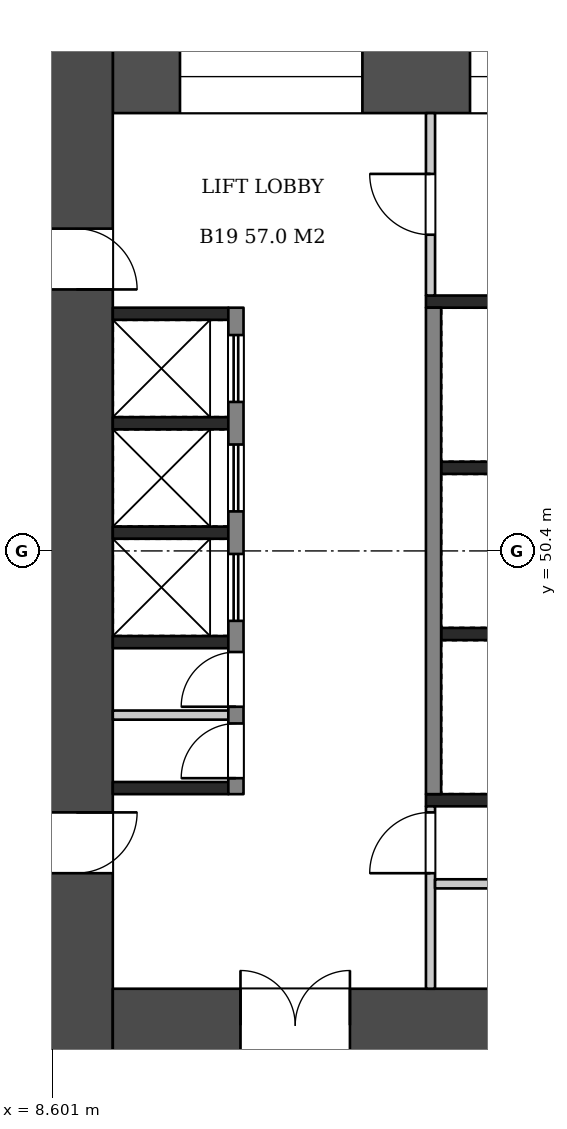
"""IFC4 building model, lengths in metres.
Left out: names, types, materials, properties, quantities, classifications, styles, units other than length and angle.
Written with IfcOpenShell. Run it as: python <this file> out.ifc"""

import sys

from ifc_helpers import new_model, si_unit, direction, frame, frame_2d, origin, place, context, subcontext, project, spatial, rectangle, extrude, element, fill, save


model = new_model("IFC4")
c1 = context("Model", 3, precision=1e-05, world=origin(), true_north=direction((0.0, 1.0)))
c2 = subcontext(c1, "Body", "Model", "MODEL_VIEW")
j1 = project(units=[si_unit("LENGTHUNIT", "METRE"), si_unit("PLANEANGLEUNIT", "RADIAN")], contexts=[c1])
p1 = place(None, origin())
s1 = spatial("IfcSite", under=j1, at=p1, CompositionType="ELEMENT")
p2 = place(p1, origin())
s2 = spatial("IfcBuilding", under=s1, at=p2, CompositionType="ELEMENT")
p3 = place(p2, frame((0.0, 0.0, 81.2)))
s3 = spatial("IfcBuildingStorey", under=s2, at=p3, CompositionType="ELEMENT", Elevation=81.2)
p4 = place(p3, frame((9.0, 58.8, 0.0), z_axis=(0.0, 0.0, 1.0), x_axis=(0.0, -1.0, 0.0)))
e1 = element("IfcWall", 1, at=p4, inside=s3, PredefinedType="SHEAR", context=c2, shape_type="SweptSolid", body=[
    extrude(rectangle(XDim=16.8, YDim=1.2, at=frame_2d((8.4, 0.0))), origin(), (0.0, 0.0, 1.0), 3.22),
])
p5 = place(p4, frame((3.1, 0.0, 0.0)))
e2 = element("IfcOpeningElement", 2, at=p5, cuts=e1, PredefinedType="OPENING", context=c2, shape_type="SweptSolid", body=[
    extrude(rectangle(XDim=1.0, YDim=2.1, at=frame_2d((0.5, 1.05))), frame((0.0, 0.61, 0.0), z_axis=(0.0, -1.0, 0.0), x_axis=(1.0, 0.0, 0.0)), (0.0, 0.0, 1.0), 1.22),
])
p6 = place(p4, frame((12.7, 0.0, 0.0)))
e3 = element("IfcOpeningElement", 3, at=p6, cuts=e1, PredefinedType="OPENING", context=c2, shape_type="SweptSolid", body=[
    extrude(rectangle(XDim=1.0, YDim=2.1, at=frame_2d((0.5, 1.05))), frame((0.0, 0.61, 0.0), z_axis=(0.0, -1.0, 0.0), x_axis=(1.0, 0.0, 0.0)), (0.0, 0.0, 1.0), 1.22),
])
p7 = place(p3, frame((9.6, 58.2, 0.0), z_axis=(0.0, 0.0, 1.0), x_axis=(1.0, 0.0, 0.0)))
e4 = element("IfcWall", 4, at=p7, inside=s3, PredefinedType="SHEAR", context=c2, shape_type="SweptSolid", body=[
    extrude(rectangle(XDim=14.4, YDim=1.2, at=frame_2d((7.2, 0.0))), origin(), (0.0, 0.0, 1.0), 3.22),
])
p8 = place(p7, frame((1.105, 0.0, 0.6)))
e5 = element("IfcOpeningElement", 5, at=p8, cuts=e4, PredefinedType="OPENING", context=c2, shape_type="SweptSolid", body=[
    extrude(rectangle(XDim=3.0, YDim=2.1, at=frame_2d((1.5, 1.05))), frame((0.0, 0.61, 0.0), z_axis=(0.0, -1.0, 0.0), x_axis=(1.0, 0.0, 0.0)), (0.0, 0.0, 1.0), 1.22),
])
p9 = place(p7, frame((5.875, 0.0, 0.6)))
e6 = element("IfcOpeningElement", 6, at=p9, cuts=e4, PredefinedType="OPENING", context=c2, shape_type="SweptSolid", body=[
    extrude(rectangle(XDim=2.4, YDim=2.1, at=frame_2d((1.2, 1.05))), frame((0.0, 0.61, 0.0), z_axis=(0.0, -1.0, 0.0), x_axis=(1.0, 0.0, 0.0)), (0.0, 0.0, 1.0), 1.22),
])
p10 = place(p7, frame((9.993, 0.0, 0.5)))
e7 = element("IfcOpeningElement", 7, at=p10, cuts=e4, PredefinedType="OPENING", context=c2, shape_type="SweptSolid", body=[
    extrude(rectangle(XDim=1.2, YDim=2.4, at=frame_2d((0.6, 1.2))), frame((0.0, 0.61, 0.0), z_axis=(0.0, -1.0, 0.0), x_axis=(1.0, 0.0, 0.0)), (0.0, 0.0, 1.0), 1.22),
])
p11 = place(p7, frame((12.197, 0.0, 0.5)))
e8 = element("IfcOpeningElement", 8, at=p11, cuts=e4, PredefinedType="OPENING", context=c2, shape_type="SweptSolid", body=[
    extrude(rectangle(XDim=1.2, YDim=2.4, at=frame_2d((0.6, 1.2))), frame((0.0, 0.61, 0.0), z_axis=(0.0, -1.0, 0.0), x_axis=(1.0, 0.0, 0.0)), (0.0, 0.0, 1.0), 1.22),
])
p12 = place(p3, frame((9.6, 42.6, 0.0), z_axis=(0.0, 0.0, 1.0), x_axis=(1.0, 0.0, 0.0)))
e9 = element("IfcWall", 9, at=p12, inside=s3, PredefinedType="SHEAR", context=c2, shape_type="SweptSolid", body=[
    extrude(rectangle(XDim=14.4, YDim=1.2, at=frame_2d((7.2, 0.0))), origin(), (0.0, 0.0, 1.0), 3.22),
])
p13 = place(p12, frame((2.1, 0.0, 0.0)))
e10 = element("IfcOpeningElement", 10, at=p13, cuts=e9, PredefinedType="OPENING", context=c2, shape_type="SweptSolid", body=[
    extrude(rectangle(XDim=1.8, YDim=2.1, at=frame_2d((0.9, 1.05))), frame((0.0, 0.61, 0.0), z_axis=(0.0, -1.0, 0.0), x_axis=(1.0, 0.0, 0.0)), (0.0, 0.0, 1.0), 1.22),
])
for number, where, z_axis, x_axis in (
    (11, (9.6, 54.3, 0.0), (0.0, 0.0, 1.0), (1.0, 0.0, 0.0)),
    (12, (9.6, 52.5, 0.0), (0.0, 0.0, 1.0), (1.0, 0.0, 0.0)),
    (13, (9.6, 50.7, 0.0), (0.0, 0.0, 1.0), (1.0, 0.0, 0.0)),
    (14, (9.6, 48.9, 0.0), (0.0, 0.0, 1.0), (1.0, 0.0, 0.0)),
    (15, (9.6, 46.5, 0.0), (0.0, 0.0, 1.0), (1.0, 0.0, 0.0)),
):
    element("IfcWall", number, at=place(p3, frame(where, z_axis=z_axis, x_axis=x_axis)), inside=s3, PredefinedType="SHEAR", context=c2, shape_type="SweptSolid", body=[
        extrude(rectangle(XDim=1.9, YDim=0.2, at=frame_2d((0.95, 0.0))), origin(), (0.0, 0.0, 1.0), 3.22),
    ])
p14 = place(p3, frame((9.6, 47.7, 0.0), z_axis=(0.0, 0.0, 1.0), x_axis=(1.0, 0.0, 0.0)))
e16 = element("IfcWall", 16, at=p14, inside=s3, PredefinedType="PARTITIONING", context=c2, shape_type="SweptSolid", body=[
    extrude(rectangle(XDim=1.9, YDim=0.15, at=frame_2d((0.95, 0.0))), origin(), (0.0, 0.0, 1.0), 3.22),
])
p15 = place(p3, frame((11.625, 54.4, 0.0), z_axis=(0.0, 0.0, 1.0), x_axis=(0.0, -1.0, 0.0)))
e17 = element("IfcWall", 17, at=p15, inside=s3, PredefinedType="SHEAR", context=c2, shape_type="SweptSolid", body=[
    extrude(rectangle(XDim=8.0, YDim=0.25, at=frame_2d((4.0, 0.0))), origin(), (0.0, 0.0, 1.0), 3.22),
])
p16 = place(p15, frame((0.45, 0.0, 0.0)))
e18 = element("IfcOpeningElement", 18, at=p16, cuts=e17, PredefinedType="OPENING", context=c2, shape_type="SweptSolid", body=[
    extrude(rectangle(XDim=1.1, YDim=2.1, at=frame_2d((0.55, 1.05))), frame((0.0, 0.135, 0.0), z_axis=(0.0, -1.0, 0.0), x_axis=(1.0, 0.0, 0.0)), (0.0, 0.0, 1.0), 0.27),
])
p17 = place(p15, frame((2.25, 0.0, 0.0)))
e19 = element("IfcOpeningElement", 19, at=p17, cuts=e17, PredefinedType="OPENING", context=c2, shape_type="SweptSolid", body=[
    extrude(rectangle(XDim=1.1, YDim=2.1, at=frame_2d((0.55, 1.05))), frame((0.0, 0.135, 0.0), z_axis=(0.0, -1.0, 0.0), x_axis=(1.0, 0.0, 0.0)), (0.0, 0.0, 1.0), 0.27),
])
p18 = place(p15, frame((4.05, 0.0, 0.0)))
e20 = element("IfcOpeningElement", 20, at=p18, cuts=e17, PredefinedType="OPENING", context=c2, shape_type="SweptSolid", body=[
    extrude(rectangle(XDim=1.1, YDim=2.1, at=frame_2d((0.55, 1.05))), frame((0.0, 0.135, 0.0), z_axis=(0.0, -1.0, 0.0), x_axis=(1.0, 0.0, 0.0)), (0.0, 0.0, 1.0), 0.27),
])
p19 = place(p15, frame((5.663, 0.0, 0.0)))
e21 = element("IfcOpeningElement", 21, at=p19, cuts=e17, PredefinedType="OPENING", context=c2, shape_type="SweptSolid", body=[
    extrude(rectangle(XDim=0.9, YDim=2.1, at=frame_2d((0.45, 1.05))), frame((0.0, 0.135, 0.0), z_axis=(0.0, -1.0, 0.0), x_axis=(1.0, 0.0, 0.0)), (0.0, 0.0, 1.0), 0.27),
])
p20 = place(p15, frame((6.837, 0.0, 0.0)))
e22 = element("IfcOpeningElement", 22, at=p20, cuts=e17, PredefinedType="OPENING", context=c2, shape_type="SweptSolid", body=[
    extrude(rectangle(XDim=0.9, YDim=2.1, at=frame_2d((0.45, 1.05))), frame((0.0, 0.135, 0.0), z_axis=(0.0, -1.0, 0.0), x_axis=(1.0, 0.0, 0.0)), (0.0, 0.0, 1.0), 0.27),
])
for number, where, z_axis, x_axis in (
    (23, (15.0, 51.767, 0.0), (0.0, 0.0, 1.0), (1.0, 0.0, 0.0)),
    (24, (15.0, 49.033, 0.0), (0.0, 0.0, 1.0), (1.0, 0.0, 0.0)),
):
    element("IfcWall", number, at=place(p3, frame(where, z_axis=z_axis, x_axis=x_axis)), inside=s3, PredefinedType="SHEAR", context=c2, shape_type="SweptSolid", body=[
        extrude(rectangle(XDim=1.9, YDim=0.2, at=frame_2d((0.95, 0.0))), origin(), (0.0, 0.0, 1.0), 3.22),
    ])
p21 = place(p3, frame((14.875, 54.4, 0.0), z_axis=(0.0, 0.0, 1.0), x_axis=(0.0, -1.0, 0.0)))
e25 = element("IfcWall", 25, at=p21, inside=s3, PredefinedType="SHEAR", context=c2, shape_type="SweptSolid", body=[
    extrude(rectangle(XDim=8.0, YDim=0.25, at=frame_2d((4.0, 0.0))), origin(), (0.0, 0.0, 1.0), 3.22),
])
p22 = place(p3, frame((14.75, 54.5, 0.0), z_axis=(0.0, 0.0, 1.0), x_axis=(1.0, 0.0, 0.0)))
e26 = element("IfcWall", 26, at=p22, inside=s3, PredefinedType="SHEAR", context=c2, shape_type="SweptSolid", body=[
    extrude(rectangle(XDim=2.4, YDim=0.2, at=frame_2d((1.2, 0.0))), origin(), (0.0, 0.0, 1.0), 3.22),
])
p23 = place(p3, frame((14.825, 57.6, 0.0), z_axis=(0.0, 0.0, 1.0), x_axis=(0.0, -1.0, 0.0)))
e27 = element("IfcWall", 27, at=p23, inside=s3, PredefinedType="PARTITIONING", context=c2, shape_type="SweptSolid", body=[
    extrude(rectangle(XDim=3.0, YDim=0.15, at=frame_2d((1.5, 0.0))), origin(), (0.0, 0.0, 1.0), 3.22),
])
p24 = place(p23, frame((1.0, 0.0, 0.0)))
e28 = element("IfcOpeningElement", 28, at=p24, cuts=e27, PredefinedType="OPENING", context=c2, shape_type="SweptSolid", body=[
    extrude(rectangle(XDim=1.0, YDim=2.1, at=frame_2d((0.5, 1.05))), frame((0.0, 0.085, 0.0), z_axis=(0.0, -1.0, 0.0), x_axis=(1.0, 0.0, 0.0)), (0.0, 0.0, 1.0), 0.17),
])
p25 = place(p3, frame((14.75, 46.3, 0.0), z_axis=(0.0, 0.0, 1.0), x_axis=(1.0, 0.0, 0.0)))
e29 = element("IfcWall", 29, at=p25, inside=s3, PredefinedType="SHEAR", context=c2, shape_type="SweptSolid", body=[
    extrude(rectangle(XDim=9.25, YDim=0.2, at=frame_2d((4.625, 0.0))), origin(), (0.0, 0.0, 1.0), 3.22),
])
p26 = place(p3, frame((14.825, 46.2, 0.0), z_axis=(0.0, 0.0, 1.0), x_axis=(0.0, -1.0, 0.0)))
e30 = element("IfcWall", 30, at=p26, inside=s3, PredefinedType="PARTITIONING", context=c2, shape_type="SweptSolid", body=[
    extrude(rectangle(XDim=3.0, YDim=0.15, at=frame_2d((1.5, 0.0))), origin(), (0.0, 0.0, 1.0), 3.22),
])
p27 = place(p26, frame((0.1, 0.0, 0.0)))
e31 = element("IfcOpeningElement", 31, at=p27, cuts=e30, PredefinedType="OPENING", context=c2, shape_type="SweptSolid", body=[
    extrude(rectangle(XDim=1.0, YDim=2.1, at=frame_2d((0.5, 1.05))), frame((0.0, 0.085, 0.0), z_axis=(0.0, -1.0, 0.0), x_axis=(1.0, 0.0, 0.0)), (0.0, 0.0, 1.0), 0.17),
])
p28 = place(p3, frame((14.9, 44.925, 0.0), z_axis=(0.0, 0.0, 1.0), x_axis=(1.0, 0.0, 0.0)))
e32 = element("IfcWall", 32, at=p28, inside=s3, PredefinedType="PARTITIONING", context=c2, shape_type="SweptSolid", body=[
    extrude(rectangle(XDim=9.1, YDim=0.15, at=frame_2d((4.55, 0.0))), origin(), (0.0, 0.0, 1.0), 3.22),
])
p29 = place(p28, frame((1.31, 0.0, 0.0)))
e33 = element("IfcOpeningElement", 33, at=p29, cuts=e32, PredefinedType="OPENING", context=c2, shape_type="SweptSolid", body=[
    extrude(rectangle(XDim=0.9, YDim=2.1, at=frame_2d((0.45, 1.05))), frame((0.0, 0.085, 0.0), z_axis=(0.0, -1.0, 0.0), x_axis=(1.0, 0.0, 0.0)), (0.0, 0.0, 1.0), 0.17),
])
p30 = place(p28, frame((4.54, 0.0, 0.0)))
e34 = element("IfcOpeningElement", 34, at=p30, cuts=e32, PredefinedType="OPENING", context=c2, shape_type="SweptSolid", body=[
    extrude(rectangle(XDim=0.9, YDim=2.1, at=frame_2d((0.45, 1.05))), frame((0.0, 0.085, 0.0), z_axis=(0.0, -1.0, 0.0), x_axis=(1.0, 0.0, 0.0)), (0.0, 0.0, 1.0), 0.17),
])
p31 = place(p28, frame((7.33, 0.0, 0.0)))
e35 = element("IfcOpeningElement", 35, at=p31, cuts=e32, PredefinedType="OPENING", context=c2, shape_type="SweptSolid", body=[
    extrude(rectangle(XDim=0.9, YDim=2.1, at=frame_2d((0.45, 1.05))), frame((0.0, 0.085, 0.0), z_axis=(0.0, -1.0, 0.0), x_axis=(1.0, 0.0, 0.0)), (0.0, 0.0, 1.0), 0.17),
])
p32 = place(p5, origin())
e36 = element("IfcDoor", 36, at=p32, inside=s3, OperationType="SINGLE_SWING_RIGHT", PredefinedType="DOOR", context=c2, shape_type="SweptSolid", body=[
    extrude(rectangle(XDim=1.0, YDim=2.1, at=frame_2d((0.5, 1.05))), frame((0.0, 0.025, 0.0), z_axis=(0.0, -1.0, 0.0), x_axis=(1.0, 0.0, 0.0)), (0.0, 0.0, 1.0), 0.05),
])
fill(e2, e36)
p33 = place(p6, origin())
e37 = element("IfcDoor", 37, at=p33, inside=s3, OperationType="SINGLE_SWING_LEFT", PredefinedType="DOOR", context=c2, shape_type="SweptSolid", body=[
    extrude(rectangle(XDim=1.0, YDim=2.1, at=frame_2d((0.5, 1.05))), frame((0.0, 0.025, 0.0), z_axis=(0.0, -1.0, 0.0), x_axis=(1.0, 0.0, 0.0)), (0.0, 0.0, 1.0), 0.05),
])
fill(e3, e37)
p34 = place(p13, origin())
e38 = element("IfcDoor", 38, at=p34, inside=s3, OperationType="DOUBLE_DOOR_SINGLE_SWING", PredefinedType="DOOR", context=c2, shape_type="SweptSolid", body=[
    extrude(rectangle(XDim=1.8, YDim=2.1, at=frame_2d((0.9, 1.05))), frame((0.0, 0.025, 0.0), z_axis=(0.0, -1.0, 0.0), x_axis=(1.0, 0.0, 0.0)), (0.0, 0.0, 1.0), 0.05),
])
fill(e10, e38)
p35 = place(p16, origin())
e39 = element("IfcDoor", 39, at=p35, inside=s3, OperationType="DOUBLE_DOOR_SLIDING", PredefinedType="DOOR", context=c2, shape_type="SweptSolid", body=[
    extrude(rectangle(XDim=1.1, YDim=2.1, at=frame_2d((0.55, 1.05))), frame((0.0, 0.025, 0.0), z_axis=(0.0, -1.0, 0.0), x_axis=(1.0, 0.0, 0.0)), (0.0, 0.0, 1.0), 0.05),
])
fill(e18, e39)
p36 = place(p17, origin())
e40 = element("IfcDoor", 40, at=p36, inside=s3, OperationType="DOUBLE_DOOR_SLIDING", PredefinedType="DOOR", context=c2, shape_type="SweptSolid", body=[
    extrude(rectangle(XDim=1.1, YDim=2.1, at=frame_2d((0.55, 1.05))), frame((0.0, 0.025, 0.0), z_axis=(0.0, -1.0, 0.0), x_axis=(1.0, 0.0, 0.0)), (0.0, 0.0, 1.0), 0.05),
])
fill(e19, e40)
p37 = place(p18, origin())
e41 = element("IfcDoor", 41, at=p37, inside=s3, OperationType="DOUBLE_DOOR_SLIDING", PredefinedType="DOOR", context=c2, shape_type="SweptSolid", body=[
    extrude(rectangle(XDim=1.1, YDim=2.1, at=frame_2d((0.55, 1.05))), frame((0.0, 0.025, 0.0), z_axis=(0.0, -1.0, 0.0), x_axis=(1.0, 0.0, 0.0)), (0.0, 0.0, 1.0), 0.05),
])
fill(e20, e41)
p38 = place(p19, frame((0.9, 0.0, 0.0), z_axis=(0.0, 0.0, 1.0), x_axis=(-1.0, 0.0, 0.0)))
e42 = element("IfcDoor", 42, at=p38, inside=s3, OperationType="SINGLE_SWING_LEFT", PredefinedType="DOOR", context=c2, shape_type="SweptSolid", body=[
    extrude(rectangle(XDim=0.9, YDim=2.1, at=frame_2d((0.45, 1.05))), frame((0.0, 0.025, 0.0), z_axis=(0.0, -1.0, 0.0), x_axis=(1.0, 0.0, 0.0)), (0.0, 0.0, 1.0), 0.05),
])
fill(e21, e42)
p39 = place(p20, frame((0.9, 0.0, 0.0), z_axis=(0.0, 0.0, 1.0), x_axis=(-1.0, 0.0, 0.0)))
e43 = element("IfcDoor", 43, at=p39, inside=s3, OperationType="SINGLE_SWING_LEFT", PredefinedType="DOOR", context=c2, shape_type="SweptSolid", body=[
    extrude(rectangle(XDim=0.9, YDim=2.1, at=frame_2d((0.45, 1.05))), frame((0.0, 0.025, 0.0), z_axis=(0.0, -1.0, 0.0), x_axis=(1.0, 0.0, 0.0)), (0.0, 0.0, 1.0), 0.05),
])
fill(e22, e43)
p40 = place(p24, frame((1.0, 0.0, 0.0), z_axis=(0.0, 0.0, 1.0), x_axis=(-1.0, 0.0, 0.0)))
e44 = element("IfcDoor", 44, at=p40, inside=s3, OperationType="SINGLE_SWING_RIGHT", PredefinedType="DOOR", context=c2, shape_type="SweptSolid", body=[
    extrude(rectangle(XDim=1.0, YDim=2.1, at=frame_2d((0.5, 1.05))), frame((0.0, 0.025, 0.0), z_axis=(0.0, -1.0, 0.0), x_axis=(1.0, 0.0, 0.0)), (0.0, 0.0, 1.0), 0.05),
])
fill(e28, e44)
p41 = place(p27, frame((1.0, 0.0, 0.0), z_axis=(0.0, 0.0, 1.0), x_axis=(-1.0, 0.0, 0.0)))
e45 = element("IfcDoor", 45, at=p41, inside=s3, OperationType="SINGLE_SWING_LEFT", PredefinedType="DOOR", context=c2, shape_type="SweptSolid", body=[
    extrude(rectangle(XDim=1.0, YDim=2.1, at=frame_2d((0.5, 1.05))), frame((0.0, 0.025, 0.0), z_axis=(0.0, -1.0, 0.0), x_axis=(1.0, 0.0, 0.0)), (0.0, 0.0, 1.0), 0.05),
])
fill(e31, e45)
p42 = place(p8, origin())
e46 = element("IfcWindow", 46, at=p42, inside=s3, PartitioningType="SINGLE_PANEL", PredefinedType="WINDOW", context=c2, shape_type="SweptSolid", body=[
    extrude(rectangle(XDim=3.0, YDim=2.1, at=frame_2d((1.5, 1.05))), frame((0.0, 0.03, 0.0), z_axis=(0.0, -1.0, 0.0), x_axis=(1.0, 0.0, 0.0)), (0.0, 0.0, 1.0), 0.06),
])
fill(e5, e46)
p43 = place(p9, origin())
e47 = element("IfcWindow", 47, at=p43, inside=s3, PartitioningType="SINGLE_PANEL", PredefinedType="WINDOW", context=c2, shape_type="SweptSolid", body=[
    extrude(rectangle(XDim=2.4, YDim=2.1, at=frame_2d((1.2, 1.05))), frame((0.0, 0.03, 0.0), z_axis=(0.0, -1.0, 0.0), x_axis=(1.0, 0.0, 0.0)), (0.0, 0.0, 1.0), 0.06),
])
fill(e6, e47)
save(model, sys.argv[1])
